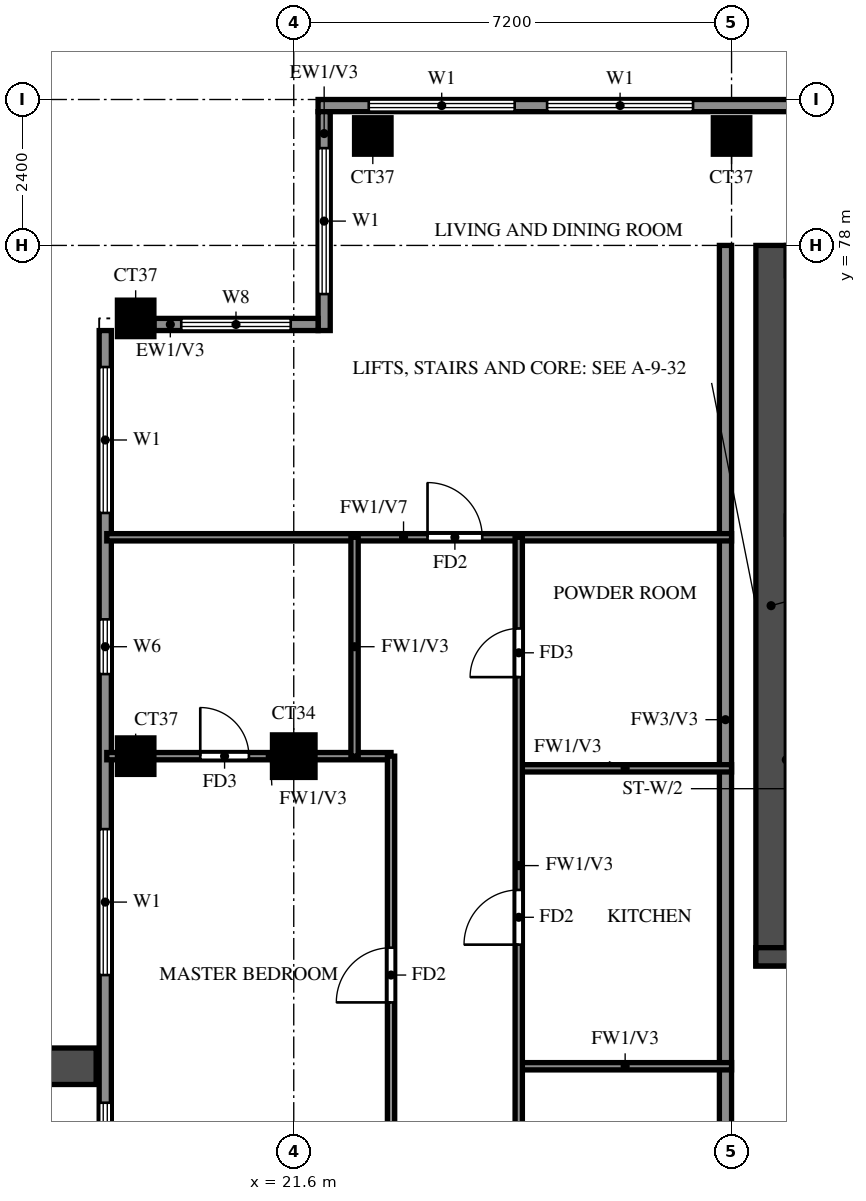
"""IFC4 building model, lengths in metres.
Left out: names, types, materials, properties, quantities, classifications, styles, units other than length and angle.
Written with IfcOpenShell. Run it as: python <this file> out.ifc"""

import sys

from ifc_helpers import new_model, si_unit, direction, frame, frame_2d, origin, origin_2d, place, context, subcontext, project, spatial, rectangle, extrude, source, transform, mapped, element, fill, save


model = new_model("IFC4")
c1 = context("Model", 3, precision=1e-05, world=origin(), true_north=direction((0.0, 1.0)))
c2 = subcontext(c1, "Body", "Model", "MODEL_VIEW")
j1 = project(units=[si_unit("LENGTHUNIT", "METRE"), si_unit("PLANEANGLEUNIT", "RADIAN")], contexts=[c1])
p1 = place(None, origin())
s1 = spatial("IfcSite", under=j1, at=p1, CompositionType="ELEMENT")
p2 = place(p1, origin())
s2 = spatial("IfcBuilding", under=s1, at=p2, CompositionType="ELEMENT")
p3 = place(p2, frame((0.0, 0.0, 253.5)))
s3 = spatial("IfcBuildingStorey", under=s2, at=p3, CompositionType="ELEMENT", Elevation=253.5)
m1 = source(origin(), c2, "Body", "SweptSolid", [
    extrude(rectangle(XDim=0.6, YDim=0.6, at=origin_2d()), origin(), (0.0, 0.0, 1.0), 3.22),
])
p4 = place(p3, frame((19.0, 69.6, 0.0), z_axis=(0.0, 0.0, 1.0), x_axis=(1.0, 0.0, 0.0)))
e1 = element("IfcColumn", 1, at=p4, inside=s3, PredefinedType="COLUMN", context=c2, shape_type="MappedRepresentation", body=[
    mapped(m1, transform((0.0, 0.0, 0.0))),
])
m2 = source(origin(), c2, "Body", "SweptSolid", [
    extrude(rectangle(XDim=0.7, YDim=0.7, at=origin_2d()), origin(), (0.0, 0.0, 1.0), 3.22),
])
p5 = place(p3, frame((21.6, 69.6, 0.0), z_axis=(0.0, 0.0, 1.0), x_axis=(1.0, 0.0, 0.0)))
e2 = element("IfcColumn", 2, at=p5, inside=s3, PredefinedType="COLUMN", context=c2, shape_type="MappedRepresentation", body=[
    mapped(m2, transform((0.0, 0.0, 0.0))),
])
for number, where, z_axis, x_axis in (
    (3, (19.0, 76.8, 0.0), (0.0, 0.0, 1.0), (1.0, 0.0, 0.0)),
    (4, (22.9, 79.8, 0.0), (0.0, 0.0, 1.0), (1.0, 0.0, 0.0)),
    (5, (28.8, 79.8, 0.0), (0.0, 0.0, 1.0), (1.0, 0.0, 0.0)),
):
    element("IfcColumn", number, at=place(p3, frame(where, z_axis=z_axis, x_axis=x_axis)), inside=s3, PredefinedType="COLUMN", context=c2, shape_type="MappedRepresentation", body=[
        mapped(m1, transform((0.0, 0.0, 0.0))),
    ])
p6 = place(p3, frame((29.45, 66.15, 0.0), z_axis=(0.0, 0.0, 1.0), x_axis=(0.0, 1.0, 0.0)))
e6 = element("IfcWall", 6, at=p6, inside=s3, PredefinedType="SHEAR", context=c2, shape_type="SweptSolid", body=[
    extrude(rectangle(XDim=11.85, YDim=0.5, at=frame_2d((5.925, 0.0))), origin(), (0.0, 0.0, 1.0), 3.22),
])
p7 = place(p3, frame((29.2, 66.3, 0.0), z_axis=(0.0, 0.0, 1.0), x_axis=(1.0, 0.0, 0.0)))
e7 = element("IfcWall", 7, at=p7, inside=s3, PredefinedType="SHEAR", context=c2, shape_type="SweptSolid", body=[
    extrude(rectangle(XDim=42.4, YDim=0.3, at=frame_2d((21.2, 0.0))), origin(), (0.0, 0.0, 1.0), 3.22),
])
p8 = place(p7, frame((1.425, 0.0, 0.0)))
e8 = element("IfcOpeningElement", 8, at=p8, cuts=e7, PredefinedType="OPENING", context=c2, shape_type="SweptSolid", body=[
    extrude(rectangle(XDim=1.1, YDim=2.1, at=frame_2d((0.55, 1.05))), frame((0.0, 0.16, 0.0), z_axis=(0.0, -1.0, 0.0), x_axis=(1.0, 0.0, 0.0)), (0.0, 0.0, 1.0), 0.32),
])
p9 = place(p7, frame((4.2, 0.0, 0.0)))
e9 = element("IfcOpeningElement", 9, at=p9, cuts=e7, PredefinedType="OPENING", context=c2, shape_type="SweptSolid", body=[
    extrude(rectangle(XDim=1.8, YDim=2.1, at=frame_2d((0.9, 1.05))), frame((0.0, 0.16, 0.0), z_axis=(0.0, -1.0, 0.0), x_axis=(1.0, 0.0, 0.0)), (0.0, 0.0, 1.0), 0.32),
])
p10 = place(p3, frame((78.6, 80.3, 0.0), z_axis=(0.0, 0.0, 1.0), x_axis=(-1.0, 0.0, 0.0)))
e10 = element("IfcWall", 10, at=p10, inside=s3, PredefinedType="SOLIDWALL", context=c2, shape_type="SweptSolid", body=[
    extrude(rectangle(XDim=56.6, YDim=0.2, at=frame_2d((28.3, 0.0))), origin(), (0.0, 0.0, 1.0), 3.22),
])
p11 = place(p10, frame((50.433, 0.0, 0.6)))
e11 = element("IfcOpeningElement", 11, at=p11, cuts=e10, PredefinedType="OPENING", context=c2, shape_type="SweptSolid", body=[
    extrude(rectangle(XDim=2.4, YDim=2.4, at=frame_2d((1.2, 1.2))), frame((0.0, 0.11, 0.0), z_axis=(0.0, -1.0, 0.0), x_axis=(1.0, 0.0, 0.0)), (0.0, 0.0, 1.0), 0.22),
])
p12 = place(p10, frame((53.367, 0.0, 0.6)))
e12 = element("IfcOpeningElement", 12, at=p12, cuts=e10, PredefinedType="OPENING", context=c2, shape_type="SweptSolid", body=[
    extrude(rectangle(XDim=2.4, YDim=2.4, at=frame_2d((1.2, 1.2))), frame((0.0, 0.11, 0.0), z_axis=(0.0, -1.0, 0.0), x_axis=(1.0, 0.0, 0.0)), (0.0, 0.0, 1.0), 0.22),
])
p13 = place(p10, frame((0.767, 0.0, 0.6)))
e13 = element("IfcOpeningElement", 13, at=p13, cuts=e10, PredefinedType="OPENING", context=c2, shape_type="SweptSolid", body=[
    extrude(rectangle(XDim=2.4, YDim=2.4, at=frame_2d((1.2, 1.2))), frame((0.0, 0.11, 0.0), z_axis=(0.0, -1.0, 0.0), x_axis=(1.0, 0.0, 0.0)), (0.0, 0.0, 1.0), 0.22),
])
p14 = place(p10, frame((3.633, 0.0, 0.6)))
e14 = element("IfcOpeningElement", 14, at=p14, cuts=e10, PredefinedType="OPENING", context=c2, shape_type="SweptSolid", body=[
    extrude(rectangle(XDim=2.4, YDim=2.4, at=frame_2d((1.2, 1.2))), frame((0.0, 0.11, 0.0), z_axis=(0.0, -1.0, 0.0), x_axis=(1.0, 0.0, 0.0)), (0.0, 0.0, 1.0), 0.22),
])
p15 = place(p3, frame((22.1, 80.2, 0.0), z_axis=(0.0, 0.0, 1.0), x_axis=(0.0, -1.0, 0.0)))
e15 = element("IfcWall", 15, at=p15, inside=s3, PredefinedType="SOLIDWALL", context=c2, shape_type="SweptSolid", body=[
    extrude(rectangle(XDim=3.6, YDim=0.2, at=frame_2d((1.8, 0.0))), origin(), (0.0, 0.0, 1.0), 3.22),
])
p16 = place(p15, frame((0.6, 0.0, 0.6)))
e16 = element("IfcOpeningElement", 16, at=p16, cuts=e15, PredefinedType="OPENING", context=c2, shape_type="SweptSolid", body=[
    extrude(rectangle(XDim=2.4, YDim=2.4, at=frame_2d((1.2, 1.2))), frame((0.0, 0.11, 0.0), z_axis=(0.0, -1.0, 0.0), x_axis=(1.0, 0.0, 0.0)), (0.0, 0.0, 1.0), 0.22),
])
p17 = place(p3, frame((22.0, 76.7, 0.0), z_axis=(0.0, 0.0, 1.0), x_axis=(-1.0, 0.0, 0.0)))
e17 = element("IfcWall", 17, at=p17, inside=s3, PredefinedType="SOLIDWALL", context=c2, shape_type="SweptSolid", body=[
    extrude(rectangle(XDim=2.7, YDim=0.2, at=frame_2d((1.35, 0.0))), origin(), (0.0, 0.0, 1.0), 3.22),
])
p18 = place(p17, frame((0.45, 0.0, 0.6)))
e18 = element("IfcOpeningElement", 18, at=p18, cuts=e17, PredefinedType="OPENING", context=c2, shape_type="SweptSolid", body=[
    extrude(rectangle(XDim=1.8, YDim=2.4, at=frame_2d((0.9, 1.2))), frame((0.0, 0.11, 0.0), z_axis=(0.0, -1.0, 0.0), x_axis=(1.0, 0.0, 0.0)), (0.0, 0.0, 1.0), 0.22),
])
p19 = place(p3, frame((18.5, 76.6, 0.0), z_axis=(0.0, 0.0, 1.0), x_axis=(0.0, -1.0, 0.0)))
e19 = element("IfcWall", 19, at=p19, inside=s3, PredefinedType="SOLIDWALL", context=c2, shape_type="SweptSolid", body=[
    extrude(rectangle(XDim=33.4, YDim=0.2, at=frame_2d((16.7, 0.0))), origin(), (0.0, 0.0, 1.0), 3.22),
])
p20 = place(p19, frame((15.1, 0.0, 0.0)))
e20 = element("IfcOpeningElement", 20, at=p20, cuts=e19, PredefinedType="OPENING", context=c2, shape_type="SweptSolid", body=[
    extrude(rectangle(XDim=1.8, YDim=2.4, at=frame_2d((0.9, 1.2))), frame((0.0, 0.11, 0.0), z_axis=(0.0, -1.0, 0.0), x_axis=(1.0, 0.0, 0.0)), (0.0, 0.0, 1.0), 0.22),
])
p21 = place(p19, frame((29.7, 0.0, 0.6)))
e21 = element("IfcOpeningElement", 21, at=p21, cuts=e19, PredefinedType="OPENING", context=c2, shape_type="SweptSolid", body=[
    extrude(rectangle(XDim=2.4, YDim=2.4, at=frame_2d((1.2, 1.2))), frame((0.0, 0.11, 0.0), z_axis=(0.0, -1.0, 0.0), x_axis=(1.0, 0.0, 0.0)), (0.0, 0.0, 1.0), 0.22),
])
p22 = place(p19, frame((25.6, 0.0, 0.6)))
e22 = element("IfcOpeningElement", 22, at=p22, cuts=e19, PredefinedType="OPENING", context=c2, shape_type="SweptSolid", body=[
    extrude(rectangle(XDim=2.4, YDim=2.4, at=frame_2d((1.2, 1.2))), frame((0.0, 0.11, 0.0), z_axis=(0.0, -1.0, 0.0), x_axis=(1.0, 0.0, 0.0)), (0.0, 0.0, 1.0), 0.22),
])
p23 = place(p19, frame((19.433, 0.0, 0.6)))
e23 = element("IfcOpeningElement", 23, at=p23, cuts=e19, PredefinedType="OPENING", context=c2, shape_type="SweptSolid", body=[
    extrude(rectangle(XDim=2.4, YDim=2.4, at=frame_2d((1.2, 1.2))), frame((0.0, 0.11, 0.0), z_axis=(0.0, -1.0, 0.0), x_axis=(1.0, 0.0, 0.0)), (0.0, 0.0, 1.0), 0.22),
])
p24 = place(p19, frame((22.167, 0.0, 0.6)))
e24 = element("IfcOpeningElement", 24, at=p24, cuts=e19, PredefinedType="OPENING", context=c2, shape_type="SweptSolid", body=[
    extrude(rectangle(XDim=2.4, YDim=2.4, at=frame_2d((1.2, 1.2))), frame((0.0, 0.11, 0.0), z_axis=(0.0, -1.0, 0.0), x_axis=(1.0, 0.0, 0.0)), (0.0, 0.0, 1.0), 0.22),
])
p25 = place(p19, frame((8.2, 0.0, 0.6)))
e25 = element("IfcOpeningElement", 25, at=p25, cuts=e19, PredefinedType="OPENING", context=c2, shape_type="SweptSolid", body=[
    extrude(rectangle(XDim=2.4, YDim=2.4, at=frame_2d((1.2, 1.2))), frame((0.0, 0.11, 0.0), z_axis=(0.0, -1.0, 0.0), x_axis=(1.0, 0.0, 0.0)), (0.0, 0.0, 1.0), 0.22),
])
p26 = place(p19, frame((12.7, 0.0, 0.6)))
e26 = element("IfcOpeningElement", 26, at=p26, cuts=e19, PredefinedType="OPENING", context=c2, shape_type="SweptSolid", body=[
    extrude(rectangle(XDim=1.2, YDim=2.4, at=frame_2d((0.6, 1.2))), frame((0.0, 0.11, 0.0), z_axis=(0.0, -1.0, 0.0), x_axis=(1.0, 0.0, 0.0)), (0.0, 0.0, 1.0), 0.22),
])
p27 = place(p19, frame((4.75, 0.0, 1.5)))
e27 = element("IfcOpeningElement", 27, at=p27, cuts=e19, PredefinedType="OPENING", context=c2, shape_type="SweptSolid", body=[
    extrude(rectangle(XDim=0.9, YDim=0.9, at=frame_2d((0.45, 0.45))), frame((0.0, 0.11, 0.0), z_axis=(0.0, -1.0, 0.0), x_axis=(1.0, 0.0, 0.0)), (0.0, 0.0, 1.0), 0.22),
])
p28 = place(p19, frame((0.6, 0.0, 0.6)))
e28 = element("IfcOpeningElement", 28, at=p28, cuts=e19, PredefinedType="OPENING", context=c2, shape_type="SweptSolid", body=[
    extrude(rectangle(XDim=2.4, YDim=2.4, at=frame_2d((1.2, 1.2))), frame((0.0, 0.11, 0.0), z_axis=(0.0, -1.0, 0.0), x_axis=(1.0, 0.0, 0.0)), (0.0, 0.0, 1.0), 0.22),
])
p29 = place(p3, frame((18.35, 64.5, 0.0), z_axis=(0.0, 0.0, 1.0), x_axis=(-1.0, 0.0, 0.0)))
e29 = element("IfcWall", 29, at=p29, inside=s3, PredefinedType="SOLIDWALL", context=c2, shape_type="SweptSolid", body=[
    extrude(rectangle(XDim=2.65, YDim=0.6, at=frame_2d((1.325, 0.0))), origin(), (0.0, 0.0, 1.0), 2.85),
])
p30 = place(p3, frame((28.7, 62.4, 0.0), z_axis=(0.0, 0.0, 1.0), x_axis=(0.0, 1.0, 0.0)))
e30 = element("IfcWall", 30, at=p30, inside=s3, PredefinedType="SOLIDWALL", context=c2, shape_type="SweptSolid", body=[
    extrude(rectangle(XDim=15.6, YDim=0.2, at=frame_2d((7.8, 0.0))), origin(), (0.0, 0.0, 1.0), 3.22),
])
for number, where, z_axis, x_axis in (
    (31, (25.3, 64.5, 0.0), (0.0, 0.0, 1.0), (1.0, 0.0, 0.0)),
    (32, (25.3, 69.4, 0.0), (0.0, 0.0, 1.0), (1.0, 0.0, 0.0)),
):
    element("IfcWall", number, at=place(p3, frame(where, z_axis=z_axis, x_axis=x_axis)), inside=s3, PredefinedType="PARTITIONING", context=c2, shape_type="SweptSolid", body=[
        extrude(rectangle(XDim=3.5, YDim=0.12, at=frame_2d((1.75, 0.0))), origin(), (0.0, 0.0, 1.0), 3.22),
    ])
p31 = place(p3, frame((18.525, 69.6, 0.0), z_axis=(0.0, 0.0, 1.0), x_axis=(1.0, 0.0, 0.0)))
e33 = element("IfcWall", 33, at=p31, inside=s3, PredefinedType="PARTITIONING", context=c2, shape_type="SweptSolid", body=[
    extrude(rectangle(XDim=4.675, YDim=0.12, at=frame_2d((2.337, 0.0))), origin(), (0.0, 0.0, 1.0), 3.22),
])
p32 = place(p31, frame((1.538, 0.0, 0.0)))
e34 = element("IfcOpeningElement", 34, at=p32, cuts=e33, PredefinedType="OPENING", context=c2, shape_type="SweptSolid", body=[
    extrude(rectangle(XDim=0.8, YDim=2.1, at=frame_2d((0.4, 1.05))), frame((0.0, 0.07, 0.0), z_axis=(0.0, -1.0, 0.0), x_axis=(1.0, 0.0, 0.0)), (0.0, 0.0, 1.0), 0.14),
])
p33 = place(p3, frame((18.525, 73.2, 0.0), z_axis=(0.0, 0.0, 1.0), x_axis=(1.0, 0.0, 0.0)))
e35 = element("IfcWall", 35, at=p33, inside=s3, PredefinedType="PARTITIONING", context=c2, shape_type="SweptSolid", body=[
    extrude(rectangle(XDim=10.275, YDim=0.12, at=frame_2d((5.138, 0.0))), origin(), (0.0, 0.0, 1.0), 2.32),
])
p34 = place(p33, frame((5.275, 0.0, 0.0)))
e36 = element("IfcOpeningElement", 36, at=p34, cuts=e35, PredefinedType="OPENING", context=c2, shape_type="SweptSolid", body=[
    extrude(rectangle(XDim=0.9, YDim=2.1, at=frame_2d((0.45, 1.05))), frame((0.0, 0.07, 0.0), z_axis=(0.0, -1.0, 0.0), x_axis=(1.0, 0.0, 0.0)), (0.0, 0.0, 1.0), 0.14),
])
p35 = place(p3, frame((22.6, 69.6, 0.0), z_axis=(0.0, 0.0, 1.0), x_axis=(0.0, 1.0, 0.0)))
e37 = element("IfcWall", 37, at=p35, inside=s3, PredefinedType="PARTITIONING", context=c2, shape_type="SweptSolid", body=[
    extrude(rectangle(XDim=3.6, YDim=0.12, at=frame_2d((1.8, 0.0))), origin(), (0.0, 0.0, 1.0), 3.22),
])
p36 = place(p3, frame((23.2, 48.0, 0.0), z_axis=(0.0, 0.0, 1.0), x_axis=(0.0, 1.0, 0.0)))
e38 = element("IfcWall", 38, at=p36, inside=s3, PredefinedType="PARTITIONING", context=c2, shape_type="SweptSolid", body=[
    extrude(rectangle(XDim=21.6, YDim=0.12, at=frame_2d((10.8, 0.0))), origin(), (0.0, 0.0, 1.0), 3.22),
])
p37 = place(p36, frame((1.35, 0.0, 0.0)))
e39 = element("IfcOpeningElement", 39, at=p37, cuts=e38, PredefinedType="OPENING", context=c2, shape_type="SweptSolid", body=[
    extrude(rectangle(XDim=0.9, YDim=2.1, at=frame_2d((0.45, 1.05))), frame((0.0, 0.07, 0.0), z_axis=(0.0, -1.0, 0.0), x_axis=(1.0, 0.0, 0.0)), (0.0, 0.0, 1.0), 0.14),
])
p38 = place(p36, frame((7.95, 0.0, 0.0)))
e40 = element("IfcOpeningElement", 40, at=p38, cuts=e38, PredefinedType="OPENING", context=c2, shape_type="SweptSolid", body=[
    extrude(rectangle(XDim=1.5, YDim=2.1, at=frame_2d((0.75, 1.05))), frame((0.0, 0.07, 0.0), z_axis=(0.0, -1.0, 0.0), x_axis=(1.0, 0.0, 0.0)), (0.0, 0.0, 1.0), 0.14),
])
p39 = place(p36, frame((12.15, 0.0, 0.0)))
e41 = element("IfcOpeningElement", 41, at=p39, cuts=e38, PredefinedType="OPENING", context=c2, shape_type="SweptSolid", body=[
    extrude(rectangle(XDim=0.9, YDim=2.1, at=frame_2d((0.45, 1.05))), frame((0.0, 0.07, 0.0), z_axis=(0.0, -1.0, 0.0), x_axis=(1.0, 0.0, 0.0)), (0.0, 0.0, 1.0), 0.14),
])
p40 = place(p36, frame((17.55, 0.0, 0.0)))
e42 = element("IfcOpeningElement", 42, at=p40, cuts=e38, PredefinedType="OPENING", context=c2, shape_type="SweptSolid", body=[
    extrude(rectangle(XDim=0.9, YDim=2.1, at=frame_2d((0.45, 1.05))), frame((0.0, 0.07, 0.0), z_axis=(0.0, -1.0, 0.0), x_axis=(1.0, 0.0, 0.0)), (0.0, 0.0, 1.0), 0.14),
])
p41 = place(p3, frame((25.3, 61.2, 0.0), z_axis=(0.0, 0.0, 1.0), x_axis=(0.0, 1.0, 0.0)))
e43 = element("IfcWall", 43, at=p41, inside=s3, PredefinedType="PARTITIONING", context=c2, shape_type="SweptSolid", body=[
    extrude(rectangle(XDim=12.0, YDim=0.12, at=frame_2d((6.0, 0.0))), origin(), (0.0, 0.0, 1.0), 3.22),
])
p42 = place(p41, frame((5.3, 0.0, 0.0)))
e44 = element("IfcOpeningElement", 44, at=p42, cuts=e43, PredefinedType="OPENING", context=c2, shape_type="SweptSolid", body=[
    extrude(rectangle(XDim=0.9, YDim=2.1, at=frame_2d((0.45, 1.05))), frame((0.0, 0.07, 0.0), z_axis=(0.0, -1.0, 0.0), x_axis=(1.0, 0.0, 0.0)), (0.0, 0.0, 1.0), 0.14),
])
p43 = place(p41, frame((9.7, 0.0, 0.0)))
e45 = element("IfcOpeningElement", 45, at=p43, cuts=e43, PredefinedType="OPENING", context=c2, shape_type="SweptSolid", body=[
    extrude(rectangle(XDim=0.8, YDim=2.1, at=frame_2d((0.4, 1.05))), frame((0.0, 0.07, 0.0), z_axis=(0.0, -1.0, 0.0), x_axis=(1.0, 0.0, 0.0)), (0.0, 0.0, 1.0), 0.14),
])
p44 = place(p11, origin())
e46 = element("IfcWindow", 46, at=p44, inside=s3, PartitioningType="DOUBLE_PANEL_VERTICAL", PredefinedType="WINDOW", context=c2, shape_type="SweptSolid", body=[
    extrude(rectangle(XDim=2.4, YDim=2.4, at=frame_2d((1.2, 1.2))), frame((0.0, 0.03, 0.0), z_axis=(0.0, -1.0, 0.0), x_axis=(1.0, 0.0, 0.0)), (0.0, 0.0, 1.0), 0.06),
])
fill(e11, e46)
p45 = place(p12, origin())
e47 = element("IfcWindow", 47, at=p45, inside=s3, PartitioningType="DOUBLE_PANEL_VERTICAL", PredefinedType="WINDOW", context=c2, shape_type="SweptSolid", body=[
    extrude(rectangle(XDim=2.4, YDim=2.4, at=frame_2d((1.2, 1.2))), frame((0.0, 0.03, 0.0), z_axis=(0.0, -1.0, 0.0), x_axis=(1.0, 0.0, 0.0)), (0.0, 0.0, 1.0), 0.06),
])
fill(e12, e47)
p46 = place(p16, origin())
e48 = element("IfcWindow", 48, at=p46, inside=s3, PartitioningType="DOUBLE_PANEL_VERTICAL", PredefinedType="WINDOW", context=c2, shape_type="SweptSolid", body=[
    extrude(rectangle(XDim=2.4, YDim=2.4, at=frame_2d((1.2, 1.2))), frame((0.0, 0.03, 0.0), z_axis=(0.0, -1.0, 0.0), x_axis=(1.0, 0.0, 0.0)), (0.0, 0.0, 1.0), 0.06),
])
fill(e16, e48)
p47 = place(p18, origin())
e49 = element("IfcWindow", 49, at=p47, inside=s3, PartitioningType="DOUBLE_PANEL_VERTICAL", PredefinedType="WINDOW", context=c2, shape_type="SweptSolid", body=[
    extrude(rectangle(XDim=1.8, YDim=2.4, at=frame_2d((0.9, 1.2))), frame((0.0, 0.03, 0.0), z_axis=(0.0, -1.0, 0.0), x_axis=(1.0, 0.0, 0.0)), (0.0, 0.0, 1.0), 0.06),
])
fill(e18, e49)
p48 = place(p25, origin())
e50 = element("IfcWindow", 50, at=p48, inside=s3, PartitioningType="DOUBLE_PANEL_VERTICAL", PredefinedType="WINDOW", context=c2, shape_type="SweptSolid", body=[
    extrude(rectangle(XDim=2.4, YDim=2.4, at=frame_2d((1.2, 1.2))), frame((0.0, 0.03, 0.0), z_axis=(0.0, -1.0, 0.0), x_axis=(1.0, 0.0, 0.0)), (0.0, 0.0, 1.0), 0.06),
])
fill(e25, e50)
p49 = place(p26, origin())
e51 = element("IfcWindow", 51, at=p49, inside=s3, PartitioningType="SINGLE_PANEL", PredefinedType="WINDOW", context=c2, shape_type="SweptSolid", body=[
    extrude(rectangle(XDim=1.2, YDim=2.4, at=frame_2d((0.6, 1.2))), frame((0.0, 0.03, 0.0), z_axis=(0.0, -1.0, 0.0), x_axis=(1.0, 0.0, 0.0)), (0.0, 0.0, 1.0), 0.06),
])
fill(e26, e51)
p50 = place(p27, origin())
e52 = element("IfcWindow", 52, at=p50, inside=s3, PartitioningType="SINGLE_PANEL", PredefinedType="WINDOW", context=c2, shape_type="SweptSolid", body=[
    extrude(rectangle(XDim=0.9, YDim=0.9, at=frame_2d((0.45, 0.45))), frame((0.0, 0.03, 0.0), z_axis=(0.0, -1.0, 0.0), x_axis=(1.0, 0.0, 0.0)), (0.0, 0.0, 1.0), 0.06),
])
fill(e27, e52)
p51 = place(p28, origin())
e53 = element("IfcWindow", 53, at=p51, inside=s3, PartitioningType="DOUBLE_PANEL_VERTICAL", PredefinedType="WINDOW", context=c2, shape_type="SweptSolid", body=[
    extrude(rectangle(XDim=2.4, YDim=2.4, at=frame_2d((1.2, 1.2))), frame((0.0, 0.03, 0.0), z_axis=(0.0, -1.0, 0.0), x_axis=(1.0, 0.0, 0.0)), (0.0, 0.0, 1.0), 0.06),
])
fill(e28, e53)
p52 = place(p40, origin())
e54 = element("IfcDoor", 54, at=p52, inside=s3, OperationType="SINGLE_SWING_RIGHT", PredefinedType="DOOR", context=c2, shape_type="SweptSolid", body=[
    extrude(rectangle(XDim=0.9, YDim=2.1, at=frame_2d((0.45, 1.05))), frame((0.0, 0.025, 0.0), z_axis=(0.0, -1.0, 0.0), x_axis=(1.0, 0.0, 0.0)), (0.0, 0.0, 1.0), 0.05),
])
fill(e42, e54)
p53 = place(p32, origin())
e55 = element("IfcDoor", 55, at=p53, inside=s3, OperationType="SINGLE_SWING_RIGHT", PredefinedType="DOOR", context=c2, shape_type="SweptSolid", body=[
    extrude(rectangle(XDim=0.8, YDim=2.1, at=frame_2d((0.4, 1.05))), frame((0.0, 0.025, 0.0), z_axis=(0.0, -1.0, 0.0), x_axis=(1.0, 0.0, 0.0)), (0.0, 0.0, 1.0), 0.05),
])
fill(e34, e55)
p54 = place(p34, origin())
e56 = element("IfcDoor", 56, at=p54, inside=s3, OperationType="SINGLE_SWING_LEFT", PredefinedType="DOOR", context=c2, shape_type="SweptSolid", body=[
    extrude(rectangle(XDim=0.9, YDim=2.1, at=frame_2d((0.45, 1.05))), frame((0.0, 0.025, 0.0), z_axis=(0.0, -1.0, 0.0), x_axis=(1.0, 0.0, 0.0)), (0.0, 0.0, 1.0), 0.05),
])
fill(e36, e56)
p55 = place(p42, origin())
e57 = element("IfcDoor", 57, at=p55, inside=s3, OperationType="SINGLE_SWING_LEFT", PredefinedType="DOOR", context=c2, shape_type="SweptSolid", body=[
    extrude(rectangle(XDim=0.9, YDim=2.1, at=frame_2d((0.45, 1.05))), frame((0.0, 0.025, 0.0), z_axis=(0.0, -1.0, 0.0), x_axis=(1.0, 0.0, 0.0)), (0.0, 0.0, 1.0), 0.05),
])
fill(e44, e57)
p56 = place(p43, origin())
e58 = element("IfcDoor", 58, at=p56, inside=s3, OperationType="SINGLE_SWING_LEFT", PredefinedType="DOOR", context=c2, shape_type="SweptSolid", body=[
    extrude(rectangle(XDim=0.8, YDim=2.1, at=frame_2d((0.4, 1.05))), frame((0.0, 0.025, 0.0), z_axis=(0.0, -1.0, 0.0), x_axis=(1.0, 0.0, 0.0)), (0.0, 0.0, 1.0), 0.05),
])
fill(e45, e58)
save(model, sys.argv[1])
